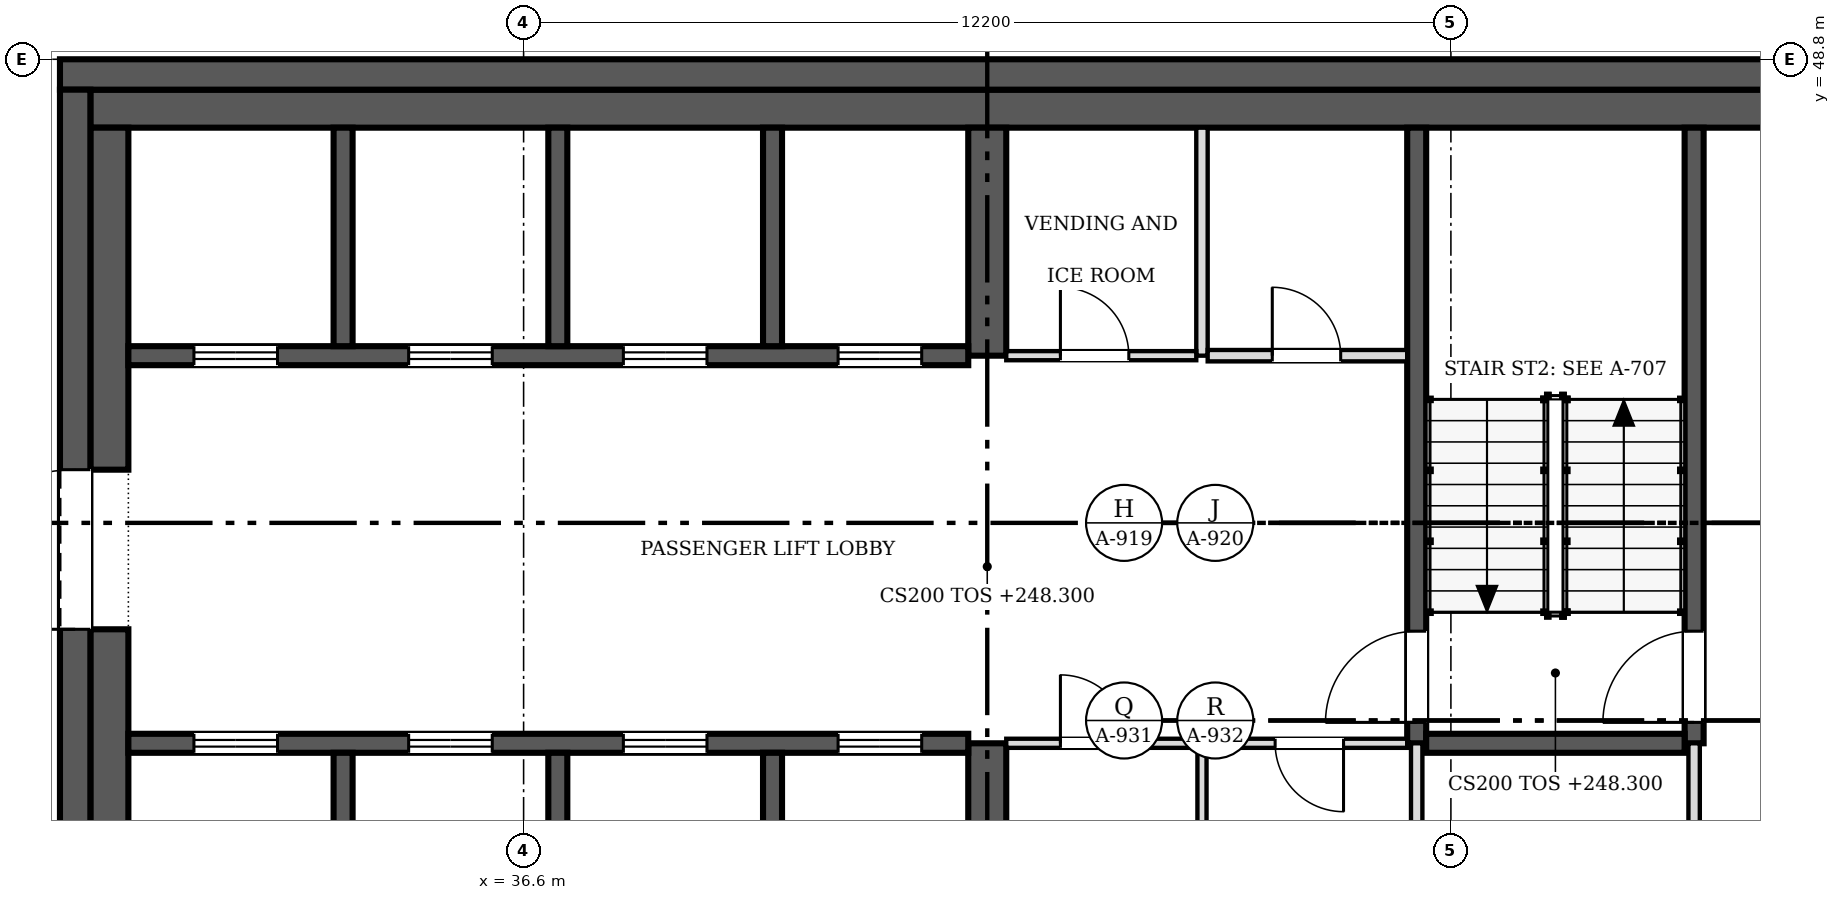
"""IFC4 building model, lengths in metres.
Left out: names, types, materials, properties, quantities, classifications, styles, units other than length and angle.
Written with IfcOpenShell. Run it as: python <this file> out.ifc"""

import sys

from ifc_helpers import new_model, si_unit, direction, frame, frame_2d, origin, place, context, subcontext, project, spatial, rectangle, extrude, source, transform, mapped, element, fill, save


model = new_model("IFC4")
c1 = context("Model", 3, precision=1e-05, world=origin(), true_north=direction((0.0, 1.0)))
c2 = subcontext(c1, "Body", "Model", "MODEL_VIEW")
j1 = project(units=[si_unit("LENGTHUNIT", "METRE"), si_unit("PLANEANGLEUNIT", "RADIAN")], contexts=[c1])
p1 = place(None, origin())
s1 = spatial("IfcSite", under=j1, at=p1, CompositionType="ELEMENT")
p2 = place(p1, origin())
s2 = spatial("IfcBuilding", under=s1, at=p2, CompositionType="ELEMENT")
p3 = place(p2, frame((0.0, 0.0, 248.3)))
s3 = spatial("IfcBuildingStorey", under=s2, at=p3, CompositionType="ELEMENT", Elevation=248.3)
p4 = place(p3, frame((30.7, 24.8, 0.0), z_axis=(0.0, 0.0, 1.0), x_axis=(0.0, 1.0, 0.0)))
e1 = element("IfcWall", 1, at=p4, inside=s3, PredefinedType="SHEAR", context=c2, shape_type="SweptSolid", body=[
    extrude(rectangle(XDim=23.6, YDim=0.4, at=frame_2d((11.8, 0.0))), origin(), (0.0, 0.0, 1.0), 3.8),
])
m1 = source(origin(), c2, "Body", "SweptSolid", [
    extrude(rectangle(XDim=2.1, YDim=2.4, at=frame_2d((1.05, 1.2))), frame((0.0, 0.21, 0.0), z_axis=(0.0, -1.0, 0.0), x_axis=(1.0, 0.0, 0.0)), (0.0, 0.0, 1.0), 0.42),
])
p5 = place(p4, frame((5.0, 0.0, 0.0)))
e2 = element("IfcOpeningElement", 2, at=p5, cuts=e1, PredefinedType="OPENING", context=c2, shape_type="MappedRepresentation", body=[
    mapped(m1, transform((0.0, 0.0, 0.0), scale=1.0)),
])
p6 = place(p4, frame((16.5, 0.0, 0.0)))
e3 = element("IfcOpeningElement", 3, at=p6, cuts=e1, PredefinedType="OPENING", context=c2, shape_type="MappedRepresentation", body=[
    mapped(m1, transform((0.0, 0.0, 0.0), scale=1.0)),
])
p7 = place(p3, frame((30.5, 48.6, 0.0), z_axis=(0.0, 0.0, 1.0), x_axis=(1.0, 0.0, 0.0)))
e4 = element("IfcWall", 4, at=p7, inside=s3, PredefinedType="SHEAR", context=c2, shape_type="SweptSolid", body=[
    extrude(rectangle(XDim=24.4, YDim=0.4, at=frame_2d((12.2, 0.0))), origin(), (0.0, 0.0, 1.0), 3.8),
])
p8 = place(p3, frame((30.9, 48.15, 0.0), z_axis=(0.0, 0.0, 1.0), x_axis=(1.0, 0.0, 0.0)))
e5 = element("IfcWall", 5, at=p8, inside=s3, PredefinedType="SOLIDWALL", context=c2, shape_type="SweptSolid", body=[
    extrude(rectangle(XDim=23.6, YDim=0.5, at=frame_2d((11.8, 0.0))), origin(), (0.0, 0.0, 1.0), 3.8),
])
p9 = place(p3, frame((31.15, 31.9, 0.0), z_axis=(0.0, 0.0, 1.0), x_axis=(0.0, 1.0, 0.0)))
e6 = element("IfcWall", 6, at=p9, inside=s3, PredefinedType="SOLIDWALL", context=c2, shape_type="SweptSolid", body=[
    extrude(rectangle(XDim=9.4, YDim=0.5, at=frame_2d((4.7, 0.0))), origin(), (0.0, 0.0, 1.0), 3.8),
])
p10 = place(p3, frame((31.15, 43.4, 0.0), z_axis=(0.0, 0.0, 1.0), x_axis=(0.0, 1.0, 0.0)))
e7 = element("IfcWall", 7, at=p10, inside=s3, PredefinedType="SOLIDWALL", context=c2, shape_type="SweptSolid", body=[
    extrude(rectangle(XDim=4.5, YDim=0.5, at=frame_2d((2.25, 0.0))), origin(), (0.0, 0.0, 1.0), 3.8),
])
p11 = place(p3, frame((42.7, 36.85, 0.0), z_axis=(0.0, 0.0, 1.0), x_axis=(0.0, 1.0, 0.0)))
e8 = element("IfcWall", 8, at=p11, inside=s3, PredefinedType="SHEAR", context=c2, shape_type="SweptSolid", body=[
    extrude(rectangle(XDim=2.95, YDim=0.5, at=frame_2d((1.475, 0.0))), origin(), (0.0, 0.0, 1.0), 3.8),
])
p12 = place(p3, frame((42.7, 44.9, 0.0), z_axis=(0.0, 0.0, 1.0), x_axis=(0.0, 1.0, 0.0)))
e9 = element("IfcWall", 9, at=p12, inside=s3, PredefinedType="SHEAR", context=c2, shape_type="SweptSolid", body=[
    extrude(rectangle(XDim=3.0, YDim=0.5, at=frame_2d((1.5, 0.0))), origin(), (0.0, 0.0, 1.0), 3.8),
])
p13 = place(p3, frame((31.4, 39.8, 0.0), z_axis=(0.0, 0.0, 1.0), x_axis=(1.0, 0.0, 0.0)))
e10 = element("IfcWall", 10, at=p13, inside=s3, PredefinedType="SOLIDWALL", context=c2, shape_type="SweptSolid", body=[
    extrude(rectangle(XDim=11.05, YDim=0.25, at=frame_2d((5.525, 0.0))), origin(), (0.0, 0.0, 1.0), 3.8),
])
m2 = source(origin(), c2, "Body", "SweptSolid", [
    extrude(rectangle(XDim=1.1, YDim=2.1, at=frame_2d((0.55, 1.05))), frame((0.0, 0.135, 0.0), z_axis=(0.0, -1.0, 0.0), x_axis=(1.0, 0.0, 0.0)), (0.0, 0.0, 1.0), 0.27),
])
p14 = place(p13, frame((0.863, 0.0, 0.0)))
e11 = element("IfcOpeningElement", 11, at=p14, cuts=e10, PredefinedType="OPENING", context=c2, shape_type="MappedRepresentation", body=[
    mapped(m2, transform((0.0, 0.0, 0.0), scale=1.0)),
])
p15 = place(p13, frame((3.688, 0.0, 0.0)))
e12 = element("IfcOpeningElement", 12, at=p15, cuts=e10, PredefinedType="OPENING", context=c2, shape_type="MappedRepresentation", body=[
    mapped(m2, transform((0.0, 0.0, 0.0), scale=1.0)),
])
p16 = place(p13, frame((6.512, 0.0, 0.0)))
e13 = element("IfcOpeningElement", 13, at=p16, cuts=e10, PredefinedType="OPENING", context=c2, shape_type="MappedRepresentation", body=[
    mapped(m2, transform((0.0, 0.0, 0.0), scale=1.0)),
])
p17 = place(p13, frame((9.337, 0.0, 0.0)))
e14 = element("IfcOpeningElement", 14, at=p17, cuts=e10, PredefinedType="OPENING", context=c2, shape_type="MappedRepresentation", body=[
    mapped(m2, transform((0.0, 0.0, 0.0), scale=1.0)),
])
p18 = place(p3, frame((42.45, 44.9, 0.0), z_axis=(0.0, 0.0, 1.0), x_axis=(-1.0, 0.0, 0.0)))
e15 = element("IfcWall", 15, at=p18, inside=s3, PredefinedType="SOLIDWALL", context=c2, shape_type="SweptSolid", body=[
    extrude(rectangle(XDim=11.05, YDim=0.25, at=frame_2d((5.525, 0.0))), origin(), (0.0, 0.0, 1.0), 3.8),
])
p19 = place(p18, frame((9.087, 0.0, 0.0)))
e16 = element("IfcOpeningElement", 16, at=p19, cuts=e15, PredefinedType="OPENING", context=c2, shape_type="MappedRepresentation", body=[
    mapped(m2, transform((0.0, 0.0, 0.0), scale=1.0)),
])
p20 = place(p18, frame((6.262, 0.0, 0.0)))
e17 = element("IfcOpeningElement", 17, at=p20, cuts=e15, PredefinedType="OPENING", context=c2, shape_type="MappedRepresentation", body=[
    mapped(m2, transform((0.0, 0.0, 0.0), scale=1.0)),
])
p21 = place(p18, frame((3.438, 0.0, 0.0)))
e18 = element("IfcOpeningElement", 18, at=p21, cuts=e15, PredefinedType="OPENING", context=c2, shape_type="MappedRepresentation", body=[
    mapped(m2, transform((0.0, 0.0, 0.0), scale=1.0)),
])
p22 = place(p18, frame((0.613, 0.0, 0.0)))
e19 = element("IfcOpeningElement", 19, at=p22, cuts=e15, PredefinedType="OPENING", context=c2, shape_type="MappedRepresentation", body=[
    mapped(m2, transform((0.0, 0.0, 0.0), scale=1.0)),
])
p23 = place(p3, frame((48.35, 47.9, 0.0), z_axis=(0.0, 0.0, 1.0), x_axis=(0.0, -1.0, 0.0)))
e20 = element("IfcWall", 20, at=p23, inside=s3, PredefinedType="SOLIDWALL", context=c2, shape_type="SweptSolid", body=[
    extrude(rectangle(XDim=8.1, YDim=0.25, at=frame_2d((4.05, 0.0))), origin(), (0.0, 0.0, 1.0), 3.8),
])
m3 = source(origin(), c2, "Body", "SweptSolid", [
    extrude(rectangle(XDim=1.2, YDim=2.1, at=frame_2d((0.6, 1.05))), frame((0.0, 0.135, 0.0), z_axis=(0.0, -1.0, 0.0), x_axis=(1.0, 0.0, 0.0)), (0.0, 0.0, 1.0), 0.27),
])
p24 = place(p23, frame((6.625, 0.0, 0.0)))
e21 = element("IfcOpeningElement", 21, at=p24, cuts=e20, PredefinedType="OPENING", context=c2, shape_type="MappedRepresentation", body=[
    mapped(m3, transform((0.0, 0.0, 0.0), scale=1.0)),
])
p25 = place(p3, frame((52.0, 39.8, 0.0), z_axis=(0.0, 0.0, 1.0), x_axis=(0.0, 1.0, 0.0)))
e22 = element("IfcWall", 22, at=p25, inside=s3, PredefinedType="SOLIDWALL", context=c2, shape_type="SweptSolid", body=[
    extrude(rectangle(XDim=8.1, YDim=0.25, at=frame_2d((4.05, 0.0))), origin(), (0.0, 0.0, 1.0), 3.8),
])
p26 = place(p25, frame((0.275, 0.0, 0.0)))
e23 = element("IfcOpeningElement", 23, at=p26, cuts=e22, PredefinedType="OPENING", context=c2, shape_type="MappedRepresentation", body=[
    mapped(m3, transform((0.0, 0.0, 0.0), scale=1.0)),
])
p27 = place(p3, frame((48.475, 39.8, 0.0), z_axis=(0.0, 0.0, 1.0), x_axis=(1.0, 0.0, 0.0)))
e24 = element("IfcWall", 24, at=p27, inside=s3, PredefinedType="SOLIDWALL", context=c2, shape_type="SweptSolid", body=[
    extrude(rectangle(XDim=3.4, YDim=0.25, at=frame_2d((1.7, 0.0))), origin(), (0.0, 0.0, 1.0), 3.8),
])
for number, where, z_axis, x_axis in (
    (25, (34.225, 36.85, 0.0), (0.0, 0.0, 1.0), (0.0, 1.0, 0.0)),
    (26, (37.05, 36.85, 0.0), (0.0, 0.0, 1.0), (0.0, 1.0, 0.0)),
    (27, (39.875, 36.85, 0.0), (0.0, 0.0, 1.0), (0.0, 1.0, 0.0)),
):
    element("IfcWall", number, at=place(p3, frame(where, z_axis=z_axis, x_axis=x_axis)), inside=s3, PredefinedType="SOLIDWALL", context=c2, shape_type="SweptSolid", body=[
        extrude(rectangle(XDim=2.825, YDim=0.25, at=frame_2d((1.413, 0.0))), origin(), (0.0, 0.0, 1.0), 3.8),
    ])
for number, where, z_axis, x_axis in (
    (28, (34.225, 45.025, 0.0), (0.0, 0.0, 1.0), (0.0, 1.0, 0.0)),
    (29, (37.05, 45.025, 0.0), (0.0, 0.0, 1.0), (0.0, 1.0, 0.0)),
    (30, (39.875, 45.025, 0.0), (0.0, 0.0, 1.0), (0.0, 1.0, 0.0)),
):
    element("IfcWall", number, at=place(p3, frame(where, z_axis=z_axis, x_axis=x_axis)), inside=s3, PredefinedType="SOLIDWALL", context=c2, shape_type="SweptSolid", body=[
        extrude(rectangle(XDim=2.875, YDim=0.25, at=frame_2d((1.438, 0.0))), origin(), (0.0, 0.0, 1.0), 3.8),
    ])
p28 = place(p3, frame((52.0, 33.525, 0.0), z_axis=(0.0, 0.0, 1.0), x_axis=(0.0, 1.0, 0.0)))
e31 = element("IfcWall", 31, at=p28, inside=s3, PredefinedType="PARTITIONING", context=c2, shape_type="SweptSolid", body=[
    extrude(rectangle(XDim=6.275, YDim=0.15, at=frame_2d((3.138, 0.0))), origin(), (0.0, 0.0, 1.0), 3.6),
])
m4 = source(origin(), c2, "Body", "SweptSolid", [
    extrude(rectangle(XDim=0.9, YDim=2.1, at=frame_2d((0.45, 1.05))), frame((0.0, 0.085, 0.0), z_axis=(0.0, -1.0, 0.0), x_axis=(1.0, 0.0, 0.0)), (0.0, 0.0, 1.0), 0.17),
])
p29 = place(p28, frame((1.025, 0.0, 0.0)))
e32 = element("IfcOpeningElement", 32, at=p29, cuts=e31, PredefinedType="OPENING", context=c2, shape_type="MappedRepresentation", body=[
    mapped(m4, transform((0.0, 0.0, 0.0), scale=1.0)),
])
p30 = place(p3, frame((48.225, 39.8, 0.0), z_axis=(0.0, 0.0, 1.0), x_axis=(-1.0, 0.0, 0.0)))
e33 = element("IfcWall", 33, at=p30, inside=s3, PredefinedType="PARTITIONING", context=c2, shape_type="SweptSolid", body=[
    extrude(rectangle(XDim=5.275, YDim=0.12, at=frame_2d((2.638, 0.0))), origin(), (0.0, 0.0, 1.0), 3.6),
])
m5 = source(origin(), c2, "Body", "SweptSolid", [
    extrude(rectangle(XDim=0.9, YDim=2.1, at=frame_2d((0.45, 1.05))), frame((0.0, 0.07, 0.0), z_axis=(0.0, -1.0, 0.0), x_axis=(1.0, 0.0, 0.0)), (0.0, 0.0, 1.0), 0.14),
])
p31 = place(p30, frame((3.663, 0.0, 0.0)))
e34 = element("IfcOpeningElement", 34, at=p31, cuts=e33, PredefinedType="OPENING", context=c2, shape_type="MappedRepresentation", body=[
    mapped(m5, transform((0.0, 0.0, 0.0), scale=1.0)),
])
p32 = place(p30, frame((0.837, 0.0, 0.0)))
e35 = element("IfcOpeningElement", 35, at=p32, cuts=e33, PredefinedType="OPENING", context=c2, shape_type="MappedRepresentation", body=[
    mapped(m5, transform((0.0, 0.0, 0.0), scale=1.0)),
])
p33 = place(p3, frame((45.525, 36.85, 0.0), z_axis=(0.0, 0.0, 1.0), x_axis=(0.0, 1.0, 0.0)))
e36 = element("IfcWall", 36, at=p33, inside=s3, PredefinedType="PARTITIONING", context=c2, shape_type="SweptSolid", body=[
    extrude(rectangle(XDim=2.89, YDim=0.12, at=frame_2d((1.445, 0.0))), origin(), (0.0, 0.0, 1.0), 3.6),
])
p34 = place(p3, frame((48.35, 36.85, 0.0), z_axis=(0.0, 0.0, 1.0), x_axis=(0.0, 1.0, 0.0)))
e37 = element("IfcWall", 37, at=p34, inside=s3, PredefinedType="PARTITIONING", context=c2, shape_type="SweptSolid", body=[
    extrude(rectangle(XDim=2.95, YDim=0.15, at=frame_2d((1.475, 0.0))), origin(), (0.0, 0.0, 1.0), 3.6),
])
p35 = place(p3, frame((45.525, 44.9, 0.0), z_axis=(0.0, 0.0, 1.0), x_axis=(0.0, 1.0, 0.0)))
e38 = element("IfcWall", 38, at=p35, inside=s3, PredefinedType="PARTITIONING", context=c2, shape_type="SweptSolid", body=[
    extrude(rectangle(XDim=3.0, YDim=0.15, at=frame_2d((1.5, 0.0))), origin(), (0.0, 0.0, 1.0), 3.6),
])
p36 = place(p3, frame((42.95, 44.9, 0.0), z_axis=(0.0, 0.0, 1.0), x_axis=(1.0, 0.0, 0.0)))
e39 = element("IfcWall", 39, at=p36, inside=s3, PredefinedType="PARTITIONING", context=c2, shape_type="SweptSolid", body=[
    extrude(rectangle(XDim=2.5, YDim=0.12, at=frame_2d((1.25, 0.0))), origin(), (0.0, 0.0, 1.0), 3.6),
])
p37 = place(p36, frame((0.712, 0.0, 0.0)))
e40 = element("IfcOpeningElement", 40, at=p37, cuts=e39, PredefinedType="OPENING", context=c2, shape_type="MappedRepresentation", body=[
    mapped(m5, transform((0.0, 0.0, 0.0), scale=1.0)),
])
p38 = place(p3, frame((45.6, 44.9, 0.0), z_axis=(0.0, 0.0, 1.0), x_axis=(1.0, 0.0, 0.0)))
e41 = element("IfcWall", 41, at=p38, inside=s3, PredefinedType="PARTITIONING", context=c2, shape_type="SweptSolid", body=[
    extrude(rectangle(XDim=2.625, YDim=0.15, at=frame_2d((1.312, 0.0))), origin(), (0.0, 0.0, 1.0), 3.6),
])
p39 = place(p38, frame((0.85, 0.0, 0.0)))
e42 = element("IfcOpeningElement", 42, at=p39, cuts=e41, PredefinedType="OPENING", context=c2, shape_type="MappedRepresentation", body=[
    mapped(m4, transform((0.0, 0.0, 0.0), scale=1.0)),
])
m6 = source(origin(), c2, "Body", "SweptSolid", [
    extrude(rectangle(XDim=2.1, YDim=2.4, at=frame_2d((1.05, 1.2))), frame((0.0, 0.025, 0.0), z_axis=(0.0, -1.0, 0.0), x_axis=(1.0, 0.0, 0.0)), (0.0, 0.0, 1.0), 0.05),
])
p40 = place(p6, origin())
e43 = element("IfcDoor", 43, at=p40, inside=s3, OperationType="DOUBLE_DOOR_SINGLE_SWING", PredefinedType="DOOR", context=c2, shape_type="MappedRepresentation", body=[
    mapped(m6, transform((0.0, 0.0, 0.0), scale=1.0)),
])
fill(e3, e43)
m7 = source(origin(), c2, "Body", "SweptSolid", [
    extrude(rectangle(XDim=1.1, YDim=2.1, at=frame_2d((0.55, 1.05))), frame((0.0, 0.025, 0.0), z_axis=(0.0, -1.0, 0.0), x_axis=(1.0, 0.0, 0.0)), (0.0, 0.0, 1.0), 0.05),
])
p41 = place(p14, origin())
e44 = element("IfcDoor", 44, at=p41, inside=s3, OperationType="DOUBLE_DOOR_SLIDING", PredefinedType="DOOR", context=c2, shape_type="MappedRepresentation", body=[
    mapped(m7, transform((0.0, 0.0, 0.0), scale=1.0)),
])
fill(e11, e44)
p42 = place(p15, origin())
e45 = element("IfcDoor", 45, at=p42, inside=s3, OperationType="DOUBLE_DOOR_SLIDING", PredefinedType="DOOR", context=c2, shape_type="MappedRepresentation", body=[
    mapped(m7, transform((0.0, 0.0, 0.0), scale=1.0)),
])
fill(e12, e45)
p43 = place(p16, origin())
e46 = element("IfcDoor", 46, at=p43, inside=s3, OperationType="DOUBLE_DOOR_SLIDING", PredefinedType="DOOR", context=c2, shape_type="MappedRepresentation", body=[
    mapped(m7, transform((0.0, 0.0, 0.0), scale=1.0)),
])
fill(e13, e46)
p44 = place(p17, origin())
e47 = element("IfcDoor", 47, at=p44, inside=s3, OperationType="DOUBLE_DOOR_SLIDING", PredefinedType="DOOR", context=c2, shape_type="MappedRepresentation", body=[
    mapped(m7, transform((0.0, 0.0, 0.0), scale=1.0)),
])
fill(e14, e47)
p45 = place(p19, origin())
e48 = element("IfcDoor", 48, at=p45, inside=s3, OperationType="DOUBLE_DOOR_SLIDING", PredefinedType="DOOR", context=c2, shape_type="MappedRepresentation", body=[
    mapped(m7, transform((0.0, 0.0, 0.0), scale=1.0)),
])
fill(e16, e48)
p46 = place(p20, origin())
e49 = element("IfcDoor", 49, at=p46, inside=s3, OperationType="DOUBLE_DOOR_SLIDING", PredefinedType="DOOR", context=c2, shape_type="MappedRepresentation", body=[
    mapped(m7, transform((0.0, 0.0, 0.0), scale=1.0)),
])
fill(e17, e49)
p47 = place(p21, origin())
e50 = element("IfcDoor", 50, at=p47, inside=s3, OperationType="DOUBLE_DOOR_SLIDING", PredefinedType="DOOR", context=c2, shape_type="MappedRepresentation", body=[
    mapped(m7, transform((0.0, 0.0, 0.0), scale=1.0)),
])
fill(e18, e50)
p48 = place(p22, origin())
e51 = element("IfcDoor", 51, at=p48, inside=s3, OperationType="DOUBLE_DOOR_SLIDING", PredefinedType="DOOR", context=c2, shape_type="MappedRepresentation", body=[
    mapped(m7, transform((0.0, 0.0, 0.0), scale=1.0)),
])
fill(e19, e51)
m8 = source(origin(), c2, "Body", "SweptSolid", [
    extrude(rectangle(XDim=1.2, YDim=2.1, at=frame_2d((0.6, 1.05))), frame((0.0, 0.025, 0.0), z_axis=(0.0, -1.0, 0.0), x_axis=(1.0, 0.0, 0.0)), (0.0, 0.0, 1.0), 0.05),
])
p49 = place(p24, origin())
e52 = element("IfcDoor", 52, at=p49, inside=s3, OperationType="SINGLE_SWING_RIGHT", PredefinedType="DOOR", context=c2, shape_type="MappedRepresentation", body=[
    mapped(m8, transform((0.0, 0.0, 0.0), scale=1.0)),
])
fill(e21, e52)
p50 = place(p26, origin())
e53 = element("IfcDoor", 53, at=p50, inside=s3, OperationType="SINGLE_SWING_LEFT", PredefinedType="DOOR", context=c2, shape_type="MappedRepresentation", body=[
    mapped(m8, transform((0.0, 0.0, 0.0), scale=1.0)),
])
fill(e23, e53)
m9 = source(origin(), c2, "Body", "SweptSolid", [
    extrude(rectangle(XDim=0.9, YDim=2.1, at=frame_2d((0.45, 1.05))), frame((0.0, 0.025, 0.0), z_axis=(0.0, -1.0, 0.0), x_axis=(1.0, 0.0, 0.0)), (0.0, 0.0, 1.0), 0.05),
])
p51 = place(p31, origin())
e54 = element("IfcDoor", 54, at=p51, inside=s3, OperationType="SINGLE_SWING_RIGHT", PredefinedType="DOOR", context=c2, shape_type="MappedRepresentation", body=[
    mapped(m9, transform((0.0, 0.0, 0.0), scale=1.0)),
])
fill(e34, e54)
p52 = place(p32, origin())
e55 = element("IfcDoor", 55, at=p52, inside=s3, OperationType="SINGLE_SWING_LEFT", PredefinedType="DOOR", context=c2, shape_type="MappedRepresentation", body=[
    mapped(m9, transform((0.0, 0.0, 0.0), scale=1.0)),
])
fill(e35, e55)
p53 = place(p37, origin())
e56 = element("IfcDoor", 56, at=p53, inside=s3, OperationType="SINGLE_SWING_LEFT", PredefinedType="DOOR", context=c2, shape_type="MappedRepresentation", body=[
    mapped(m9, transform((0.0, 0.0, 0.0), scale=1.0)),
])
fill(e40, e56)
p54 = place(p39, origin())
e57 = element("IfcDoor", 57, at=p54, inside=s3, OperationType="SINGLE_SWING_LEFT", PredefinedType="DOOR", context=c2, shape_type="MappedRepresentation", body=[
    mapped(m9, transform((0.0, 0.0, 0.0), scale=1.0)),
])
fill(e42, e57)
save(model, sys.argv[1])
